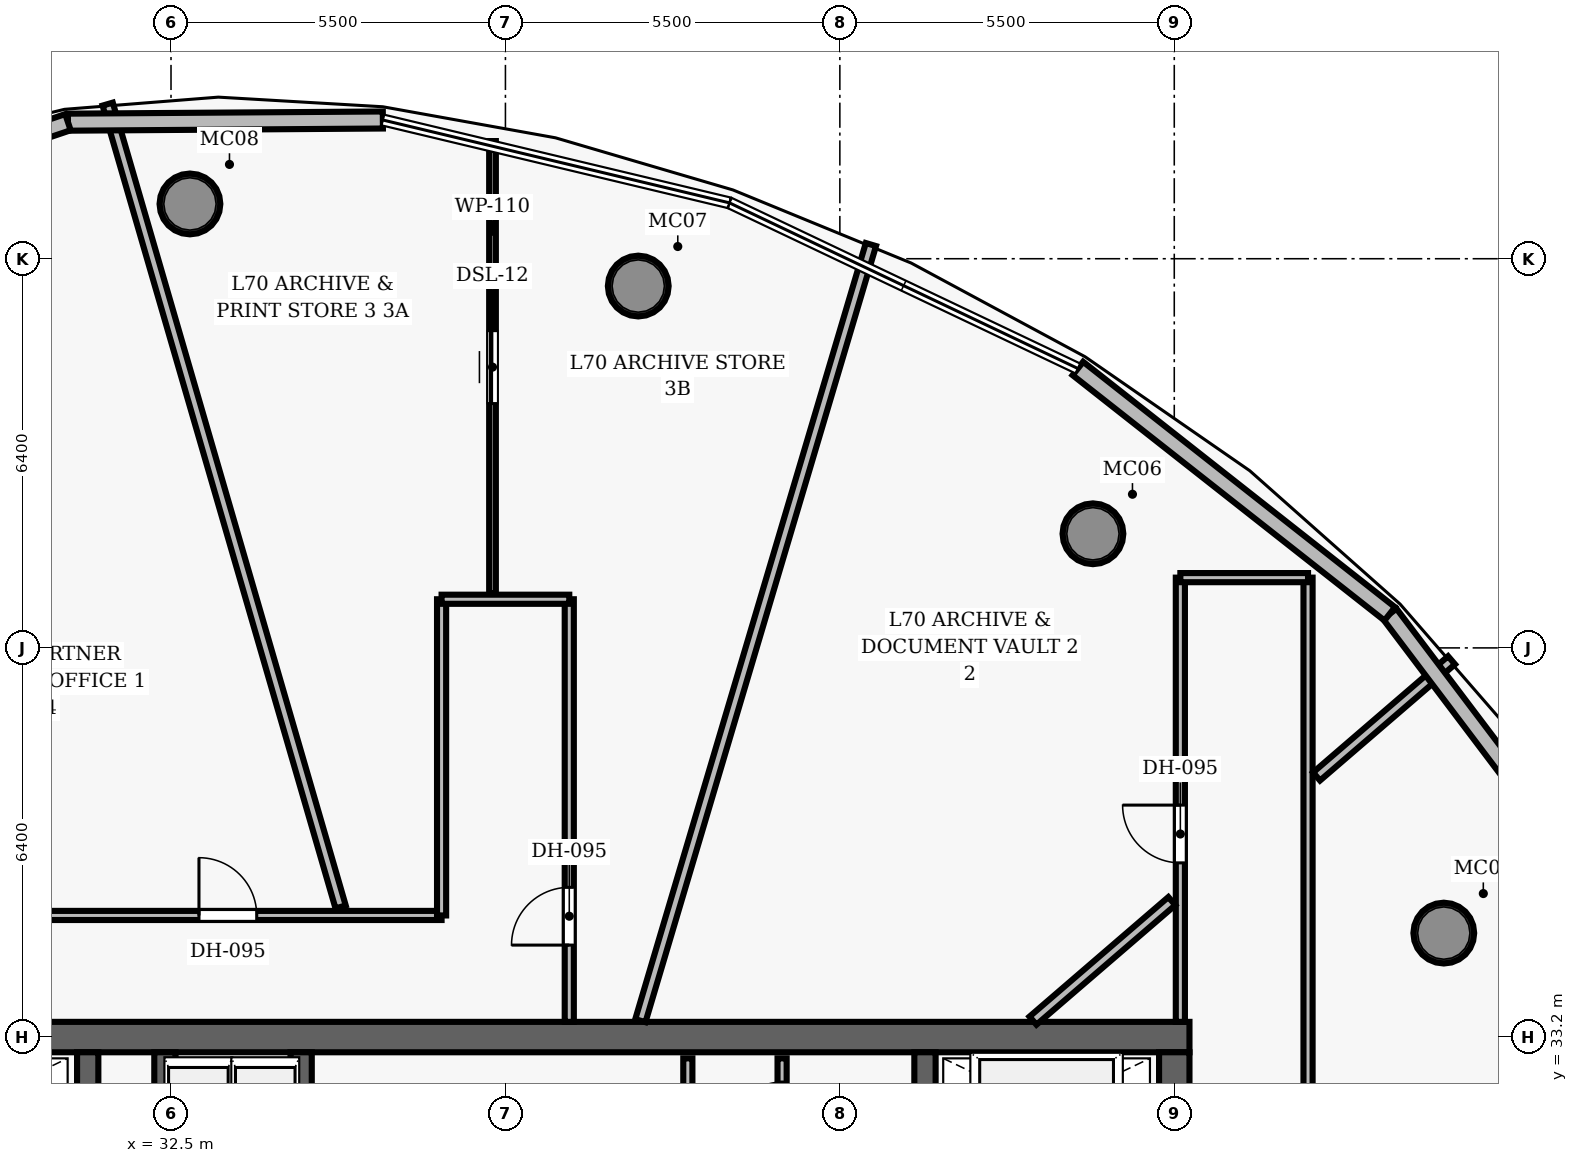
"""IFC4 building model, lengths in metres.
Left out: names, types, materials, properties, quantities, classifications, styles, units other than length and angle.
Written with IfcOpenShell. Run it as: python <this file> out.ifc"""

import sys

from ifc_helpers import new_model, si_unit, direction, frame, frame_2d, origin, origin_2d, place, context, subcontext, project, spatial, rectangle, hollow_circle, extrude, element, fill, save


model = new_model("IFC4")
c1 = context("Model", 3, precision=1e-05, world=origin(), true_north=direction((0.0, 1.0)))
c2 = subcontext(c1, "Body", "Model", "MODEL_VIEW")
j1 = project(units=[si_unit("LENGTHUNIT", "METRE"), si_unit("PLANEANGLEUNIT", "RADIAN")], contexts=[c1])
p1 = place(None, origin())
s1 = spatial("IfcSite", under=j1, at=p1, CompositionType="ELEMENT")
p2 = place(p1, origin())
s2 = spatial("IfcBuilding", under=s1, at=p2, CompositionType="ELEMENT")
p3 = place(p2, frame((0.0, 0.0, 276.7)))
s3 = spatial("IfcBuildingStorey", under=s2, at=p3, CompositionType="ELEMENT", Elevation=276.7)
p4 = place(p3, frame((26.75, 33.2, 0.0), z_axis=(0.0, 0.0, 1.0), x_axis=(1.0, 0.0, 0.0)))
e1 = element("IfcWall", 1, at=p4, inside=s3, PredefinedType="SHEAR", context=c2, shape_type="SweptSolid", body=[
    extrude(rectangle(XDim=22.5, YDim=0.5, at=frame_2d((11.25, 0.0))), origin(), (0.0, 0.0, 1.0), 3.85),
])
p5 = place(p3, frame((49.0, 19.05, 0.0), z_axis=(0.0, 0.0, 1.0), x_axis=(0.0, 1.0, 0.0)))
e2 = element("IfcWall", 2, at=p5, inside=s3, PredefinedType="SHEAR", context=c2, shape_type="SweptSolid", body=[
    extrude(rectangle(XDim=13.9, YDim=0.5, at=frame_2d((6.95, 0.0))), origin(), (0.0, 0.0, 1.0), 3.85),
])
p6 = place(p5, frame((8.2, 0.0, 0.0)))
e3 = element("IfcOpeningElement", 3, at=p6, cuts=e2, PredefinedType="OPENING", context=c2, shape_type="SweptSolid", body=[
    extrude(rectangle(XDim=1.05, YDim=2.15, at=frame_2d((0.525, 1.075))), frame((0.0, 0.26, 0.0), z_axis=(0.0, -1.0, 0.0), x_axis=(1.0, 0.0, 0.0)), (0.0, 0.0, 1.0), 0.52),
])
for number, where, z_axis, x_axis in (
    (4, (31.13, 19.05, 0.0), (0.0, 0.0, 1.0), (0.0, 1.0, 0.0)),
    (5, (44.9, 19.05, 0.0), (0.0, 0.0, 1.0), (0.0, 1.0, 0.0)),
):
    element("IfcWall", number, at=place(p3, frame(where, z_axis=z_axis, x_axis=x_axis)), inside=s3, PredefinedType="SHEAR", context=c2, shape_type="SweptSolid", body=[
        extrude(rectangle(XDim=13.9, YDim=0.35, at=frame_2d((6.95, 0.0))), origin(), (0.0, 0.0, 1.0), 3.85),
    ])
for number, where, z_axis, x_axis in (
    (6, (53.433, 34.91, 0.0), (0.0, 0.0, 1.0), (1.0, 0.0, 0.0)),
    (7, (47.662, 41.477, 0.0), (0.0, 0.0, 1.0), (1.0, 0.0, 0.0)),
    (8, (40.185, 45.551, 0.0), (0.0, 0.0, 1.0), (1.0, 0.0, 0.0)),
    (9, (32.812, 46.901, 0.0), (0.0, 0.0, 1.0), (1.0, 0.0, 0.0)),
):
    element("IfcColumn", number, at=place(p3, frame(where, z_axis=z_axis, x_axis=x_axis)), inside=s3, PredefinedType="COLUMN", context=c2, shape_type="SweptSolid", body=[
        extrude(hollow_circle(Radius=0.5, WallThickness=0.045, at=origin_2d()), origin(), (0.0, 0.0, 1.0), 3.85),
    ])
p7 = place(p3, frame((34.64, 26.69, 0.0), z_axis=(0.0, 0.0, 1.0), x_axis=(0.0, 1.0, 0.0)))
e10 = element("IfcWall", 10, at=p7, inside=s3, PredefinedType="SHEAR", context=c2, shape_type="SweptSolid", body=[
    extrude(rectangle(XDim=6.26, YDim=0.35, at=frame_2d((3.13, 0.0))), origin(), (0.0, 0.0, 1.0), 3.85),
])
p8 = place(p7, frame((0.85, 0.0, 0.0)))
e11 = element("IfcOpeningElement", 11, at=p8, cuts=e10, PredefinedType="OPENING", context=c2, shape_type="SweptSolid", body=[
    extrude(rectangle(XDim=1.05, YDim=2.15, at=frame_2d((0.525, 1.075))), frame((0.0, 0.185, 0.0), z_axis=(0.0, -1.0, 0.0), x_axis=(1.0, 0.0, 0.0)), (0.0, 0.0, 1.0), 0.37),
])
p9 = place(p3, frame((32.4, 30.22, 0.0), z_axis=(0.0, 0.0, 1.0), x_axis=(0.0, 1.0, 0.0)))
e12 = element("IfcWall", 12, at=p9, inside=s3, PredefinedType="SHEAR", context=c2, shape_type="SweptSolid", body=[
    extrude(rectangle(XDim=2.73, YDim=0.35, at=frame_2d((1.365, 0.0))), origin(), (0.0, 0.0, 1.0), 3.04),
])
p10 = place(p3, frame((41.0, 28.95, 0.0), z_axis=(0.0, 0.0, 1.0), x_axis=(0.0, 1.0, 0.0)))
e13 = element("IfcWall", 13, at=p10, inside=s3, PredefinedType="PARTITIONING", context=c2, shape_type="SweptSolid", body=[
    extrude(rectangle(XDim=3.9, YDim=0.15, at=frame_2d((1.95, 0.0))), origin(), (0.0, 0.0, 1.0), 3.04),
])
p11 = place(p10, frame((0.7, 0.0, 0.0)))
e14 = element("IfcOpeningElement", 14, at=p11, cuts=e13, PredefinedType="OPENING", context=c2, shape_type="SweptSolid", body=[
    extrude(rectangle(XDim=0.85, YDim=2.1, at=frame_2d((0.425, 1.05))), frame((0.0, 0.085, 0.0), z_axis=(0.0, -1.0, 0.0), x_axis=(1.0, 0.0, 0.0)), (0.0, 0.0, 1.0), 0.17),
])
p12 = place(p3, frame((42.55, 28.1, 0.0), z_axis=(0.0, 0.0, 1.0), x_axis=(0.0, 1.0, 0.0)))
e15 = element("IfcWall", 15, at=p12, inside=s3, PredefinedType="PARTITIONING", context=c2, shape_type="SweptSolid", body=[
    extrude(rectangle(XDim=4.75, YDim=0.15, at=frame_2d((2.375, 0.0))), origin(), (0.0, 0.0, 1.0), 3.04),
])
p13 = place(p12, frame((0.35, 0.0, 0.0)))
e16 = element("IfcOpeningElement", 16, at=p13, cuts=e15, PredefinedType="OPENING", context=c2, shape_type="SweptSolid", body=[
    extrude(rectangle(XDim=0.85, YDim=2.1, at=frame_2d((0.425, 1.05))), frame((0.0, 0.085, 0.0), z_axis=(0.0, -1.0, 0.0), x_axis=(1.0, 0.0, 0.0)), (0.0, 0.0, 1.0), 0.17),
])
p14 = place(p12, frame((1.93, 0.0, 0.0)))
e17 = element("IfcOpeningElement", 17, at=p14, cuts=e15, PredefinedType="OPENING", context=c2, shape_type="SweptSolid", body=[
    extrude(rectangle(XDim=0.85, YDim=2.1, at=frame_2d((0.425, 1.05))), frame((0.0, 0.085, 0.0), z_axis=(0.0, -1.0, 0.0), x_axis=(1.0, 0.0, 0.0)), (0.0, 0.0, 1.0), 0.17),
])
p15 = place(p12, frame((3.51, 0.0, 0.0)))
e18 = element("IfcOpeningElement", 18, at=p15, cuts=e15, PredefinedType="OPENING", context=c2, shape_type="SweptSolid", body=[
    extrude(rectangle(XDim=0.85, YDim=2.1, at=frame_2d((0.425, 1.05))), frame((0.0, 0.085, 0.0), z_axis=(0.0, -1.0, 0.0), x_axis=(1.0, 0.0, 0.0)), (0.0, 0.0, 1.0), 0.17),
])
p16 = place(p3, frame((26.9, 35.2, 0.0), z_axis=(0.0, 0.0, 1.0), x_axis=(1.0, 0.0, 0.0)))
e19 = element("IfcWall", 19, at=p16, inside=s3, PredefinedType="PARTITIONING", context=c2, shape_type="SweptSolid", body=[
    extrude(rectangle(XDim=10.05, YDim=0.15, at=frame_2d((5.025, 0.0))), origin(), (0.0, 0.0, 1.0), 3.04),
])
p17 = place(p16, frame((6.06, 0.0, 0.0)))
e20 = element("IfcOpeningElement", 20, at=p17, cuts=e19, PredefinedType="OPENING", context=c2, shape_type="SweptSolid", body=[
    extrude(rectangle(XDim=0.95, YDim=2.15, at=frame_2d((0.475, 1.075))), frame((0.0, 0.085, 0.0), z_axis=(0.0, -1.0, 0.0), x_axis=(1.0, 0.0, 0.0)), (0.0, 0.0, 1.0), 0.17),
])
p18 = place(p3, frame((51.2, 10.6, 0.0), z_axis=(0.0, 0.0, 1.0), x_axis=(0.0, 1.0, 0.0)))
e21 = element("IfcWall", 21, at=p18, inside=s3, PredefinedType="PARTITIONING", context=c2, shape_type="SweptSolid", body=[
    extrude(rectangle(XDim=30.156, YDim=0.15, at=frame_2d((15.078, 0.0))), origin(), (0.0, 0.0, 1.0), 3.04),
])
p19 = place(p18, frame((19.053, 0.0, 0.0)))
e22 = element("IfcOpeningElement", 22, at=p19, cuts=e21, PredefinedType="OPENING", context=c2, shape_type="SweptSolid", body=[
    extrude(rectangle(XDim=0.95, YDim=2.15, at=frame_2d((0.475, 1.075))), frame((0.0, 0.085, 0.0), z_axis=(0.0, -1.0, 0.0), x_axis=(1.0, 0.0, 0.0)), (0.0, 0.0, 1.0), 0.17),
])
p20 = place(p18, frame((11.504, 0.0, 0.0)))
e23 = element("IfcOpeningElement", 23, at=p20, cuts=e21, PredefinedType="OPENING", context=c2, shape_type="SweptSolid", body=[
    extrude(rectangle(XDim=0.95, YDim=2.15, at=frame_2d((0.475, 1.075))), frame((0.0, 0.085, 0.0), z_axis=(0.0, -1.0, 0.0), x_axis=(1.0, 0.0, 0.0)), (0.0, 0.0, 1.0), 0.17),
])
p21 = place(p3, frame((49.1, 33.45, 0.0), z_axis=(0.0, 0.0, 1.0), x_axis=(0.0, 1.0, 0.0)))
e24 = element("IfcWall", 24, at=p21, inside=s3, PredefinedType="PARTITIONING", context=c2, shape_type="SweptSolid", body=[
    extrude(rectangle(XDim=7.306, YDim=0.15, at=frame_2d((3.653, 0.0))), origin(), (0.0, 0.0, 1.0), 3.04),
])
p22 = place(p21, frame((2.615, 0.0, 0.0)))
e25 = element("IfcOpeningElement", 25, at=p22, cuts=e24, PredefinedType="OPENING", context=c2, shape_type="SweptSolid", body=[
    extrude(rectangle(XDim=0.95, YDim=2.15, at=frame_2d((0.475, 1.075))), frame((0.0, 0.085, 0.0), z_axis=(0.0, -1.0, 0.0), x_axis=(1.0, 0.0, 0.0)), (0.0, 0.0, 1.0), 0.17),
])
p23 = place(p3, frame((49.1, 40.756, 0.0), z_axis=(0.0, 0.0, 1.0), x_axis=(1.0, 0.0, 0.0)))
e26 = element("IfcWall", 26, at=p23, inside=s3, PredefinedType="PARTITIONING", context=c2, shape_type="SweptSolid", body=[
    extrude(rectangle(XDim=2.1, YDim=0.15, at=frame_2d((1.05, 0.0))), origin(), (0.0, 0.0, 1.0), 3.04),
])
p24 = place(p3, frame((36.95, 35.2, 0.0), z_axis=(0.0, 0.0, 1.0), x_axis=(0.0, 1.0, 0.0)))
e27 = element("IfcWall", 27, at=p24, inside=s3, PredefinedType="PARTITIONING", context=c2, shape_type="SweptSolid", body=[
    extrude(rectangle(XDim=5.2, YDim=0.15, at=frame_2d((2.6, 0.0))), origin(), (0.0, 0.0, 1.0), 3.04),
])
p25 = place(p3, frame((39.05, 33.45, 0.0), z_axis=(0.0, 0.0, 1.0), x_axis=(0.0, 1.0, 0.0)))
e28 = element("IfcWall", 28, at=p25, inside=s3, PredefinedType="PARTITIONING", context=c2, shape_type="SweptSolid", body=[
    extrude(rectangle(XDim=6.95, YDim=0.15, at=frame_2d((3.475, 0.0))), origin(), (0.0, 0.0, 1.0), 3.04),
])
p26 = place(p25, frame((1.262, 0.0, 0.0)))
e29 = element("IfcOpeningElement", 29, at=p26, cuts=e28, PredefinedType="OPENING", context=c2, shape_type="SweptSolid", body=[
    extrude(rectangle(XDim=0.95, YDim=2.15, at=frame_2d((0.475, 1.075))), frame((0.0, 0.085, 0.0), z_axis=(0.0, -1.0, 0.0), x_axis=(1.0, 0.0, 0.0)), (0.0, 0.0, 1.0), 0.17),
])
p27 = place(p3, frame((36.95, 40.4, 0.0), z_axis=(0.0, 0.0, 1.0), x_axis=(1.0, 0.0, 0.0)))
e30 = element("IfcWall", 30, at=p27, inside=s3, PredefinedType="PARTITIONING", context=c2, shape_type="SweptSolid", body=[
    extrude(rectangle(XDim=2.1, YDim=0.15, at=frame_2d((1.05, 0.0))), origin(), (0.0, 0.0, 1.0), 3.04),
])
p28 = place(p3, frame((46.676, 33.47, 0.0), z_axis=(0.0, 0.0, 1.0), x_axis=(0.757802183171, 0.652484368534, 0.0)))
e31 = element("IfcWall", 31, at=p28, inside=s3, PredefinedType="PARTITIONING", context=c2, shape_type="SweptSolid", body=[
    extrude(rectangle(XDim=3.014, YDim=0.175, at=frame_2d((1.507, 0.0))), origin(), (0.0, 0.0, 1.0), 3.04),
])
p29 = place(p3, frame((51.34, 37.485, 0.0), z_axis=(0.0, 0.0, 1.0), x_axis=(0.757854651691, 0.65242342609, 0.0)))
e32 = element("IfcWall", 32, at=p29, inside=s3, PredefinedType="PARTITIONING", context=c2, shape_type="SweptSolid", body=[
    extrude(rectangle(XDim=2.929, YDim=0.175, at=frame_2d((1.465, 0.0))), origin(), (0.0, 0.0, 1.0), 3.04),
])
p30 = place(p3, frame((40.219, 33.47, 0.0), z_axis=(0.0, 0.0, 1.0), x_axis=(0.284761265489, 0.958598467387, 0.0)))
e33 = element("IfcWall", 33, at=p30, inside=s3, PredefinedType="PARTITIONING", context=c2, shape_type="SweptSolid", body=[
    extrude(rectangle(XDim=13.315, YDim=0.175, at=frame_2d((6.657, 0.0))), origin(), (0.0, 0.0, 1.0), 3.04),
])
p31 = place(p3, frame((35.29, 35.34, 0.0), z_axis=(0.0, 0.0, 1.0), x_axis=(-0.278694485612, 0.960379812204, 0.0)))
e34 = element("IfcWall", 34, at=p31, inside=s3, PredefinedType="PARTITIONING", context=c2, shape_type="SweptSolid", body=[
    extrude(rectangle(XDim=13.747, YDim=0.175, at=frame_2d((6.874, 0.0))), origin(), (0.0, 0.0, 1.0), 3.04),
])
p32 = place(p3, frame((37.788, 40.5, 0.0), z_axis=(0.0, 0.0, 1.0), x_axis=(0.0, 1.0, 0.0)))
e35 = element("IfcWall", 35, at=p32, inside=s3, PredefinedType="PARTITIONING", context=c2, shape_type="SweptSolid", body=[
    extrude(rectangle(XDim=7.435, YDim=0.11, at=frame_2d((3.717, 0.0))), origin(), (0.0, 0.0, 1.0), 3.04),
])
p33 = place(p32, frame((3.117, 0.0, 0.0)))
e36 = element("IfcOpeningElement", 36, at=p33, cuts=e35, PredefinedType="OPENING", context=c2, shape_type="SweptSolid", body=[
    extrude(rectangle(XDim=1.2, YDim=2.15, at=frame_2d((0.6, 1.075))), frame((0.0, 0.065, 0.0), z_axis=(0.0, -1.0, 0.0), x_axis=(1.0, 0.0, 0.0)), (0.0, 0.0, 1.0), 0.13),
])
p34 = place(p3, frame((52.543, 40.16, 0.0), z_axis=(0.0, 0.0, 1.0), x_axis=(0.602964309208, -0.797768162953, 0.0)))
e37 = element("IfcWall", 37, at=p34, inside=s3, PredefinedType="SOLIDWALL", context=c2, shape_type="SweptSolid", body=[
    extrude(rectangle(XDim=6.527, YDim=0.28, at=frame_2d((3.264, 0.0))), origin(), (0.0, 0.0, 1.0), 3.625),
])
p35 = place(p3, frame((47.414, 44.195, 0.0), z_axis=(0.0, 0.0, 1.0), x_axis=(0.785937839429, -0.618305517163, 0.0)))
e38 = element("IfcWall", 38, at=p35, inside=s3, PredefinedType="SOLIDWALL", context=c2, shape_type="SweptSolid", body=[
    extrude(rectangle(XDim=6.526, YDim=0.28, at=frame_2d((3.263, 0.0))), origin(), (0.0, 0.0, 1.0), 3.625),
])
p36 = place(p3, frame((30.805, 48.246, 0.0), z_axis=(0.0, 0.0, 1.0), x_axis=(0.999976318175, 0.006882084588, 0.0)))
e39 = element("IfcWall", 39, at=p36, inside=s3, PredefinedType="SOLIDWALL", context=c2, shape_type="SweptSolid", body=[
    extrude(rectangle(XDim=5.179, YDim=0.28, at=frame_2d((2.59, 0.0))), origin(), (0.0, 0.0, 1.0), 3.625),
])
p37 = place(p3, frame((26.399, 46.758, 0.0), z_axis=(0.0, 0.0, 1.0), x_axis=(0.947463644546, 0.319863474414, 0.0)))
e40 = element("IfcWall", 40, at=p37, inside=s3, PredefinedType="SOLIDWALL", context=c2, shape_type="SweptSolid", body=[
    extrude(rectangle(XDim=4.651, YDim=0.28, at=frame_2d((2.325, 0.0))), origin(), (0.0, 0.0, 1.0), 3.625),
])
p38 = place(p15, origin())
e41 = element("IfcDoor", 41, at=p38, inside=s3, OperationType="SINGLE_SWING_LEFT", PredefinedType="DOOR", context=c2, shape_type="SweptSolid", body=[
    extrude(rectangle(XDim=0.85, YDim=2.1, at=frame_2d((0.425, 1.05))), frame((0.0, 0.025, 0.0), z_axis=(0.0, -1.0, 0.0), x_axis=(1.0, 0.0, 0.0)), (0.0, 0.0, 1.0), 0.05),
])
fill(e18, e41)
p39 = place(p22, origin())
e42 = element("IfcDoor", 42, at=p39, inside=s3, OperationType="SINGLE_SWING_RIGHT", PredefinedType="DOOR", context=c2, shape_type="SweptSolid", body=[
    extrude(rectangle(XDim=0.95, YDim=2.15, at=frame_2d((0.475, 1.075))), frame((0.0, 0.025, 0.0), z_axis=(0.0, -1.0, 0.0), x_axis=(1.0, 0.0, 0.0)), (0.0, 0.0, 1.0), 0.05),
])
fill(e25, e42)
p40 = place(p26, origin())
e43 = element("IfcDoor", 43, at=p40, inside=s3, OperationType="SINGLE_SWING_LEFT", PredefinedType="DOOR", context=c2, shape_type="SweptSolid", body=[
    extrude(rectangle(XDim=0.95, YDim=2.15, at=frame_2d((0.475, 1.075))), frame((0.0, 0.025, 0.0), z_axis=(0.0, -1.0, 0.0), x_axis=(1.0, 0.0, 0.0)), (0.0, 0.0, 1.0), 0.05),
])
fill(e29, e43)
p41 = place(p33, origin())
e44 = element("IfcDoor", 44, at=p41, inside=s3, OperationType="SLIDING_TO_RIGHT", PredefinedType="DOOR", context=c2, shape_type="SweptSolid", body=[
    extrude(rectangle(XDim=1.2, YDim=2.15, at=frame_2d((0.6, 1.075))), frame((0.0, 0.025, 0.0), z_axis=(0.0, -1.0, 0.0), x_axis=(1.0, 0.0, 0.0)), (0.0, 0.0, 1.0), 0.05),
])
fill(e36, e44)
p42 = place(p17, origin())
e45 = element("IfcDoor", 45, at=p42, inside=s3, OperationType="SINGLE_SWING_LEFT", PredefinedType="DOOR", context=c2, shape_type="SweptSolid", body=[
    extrude(rectangle(XDim=0.95, YDim=2.15, at=frame_2d((0.475, 1.075))), frame((0.0, 0.025, 0.0), z_axis=(0.0, -1.0, 0.0), x_axis=(1.0, 0.0, 0.0)), (0.0, 0.0, 1.0), 0.05),
])
fill(e20, e45)
save(model, sys.argv[1])
